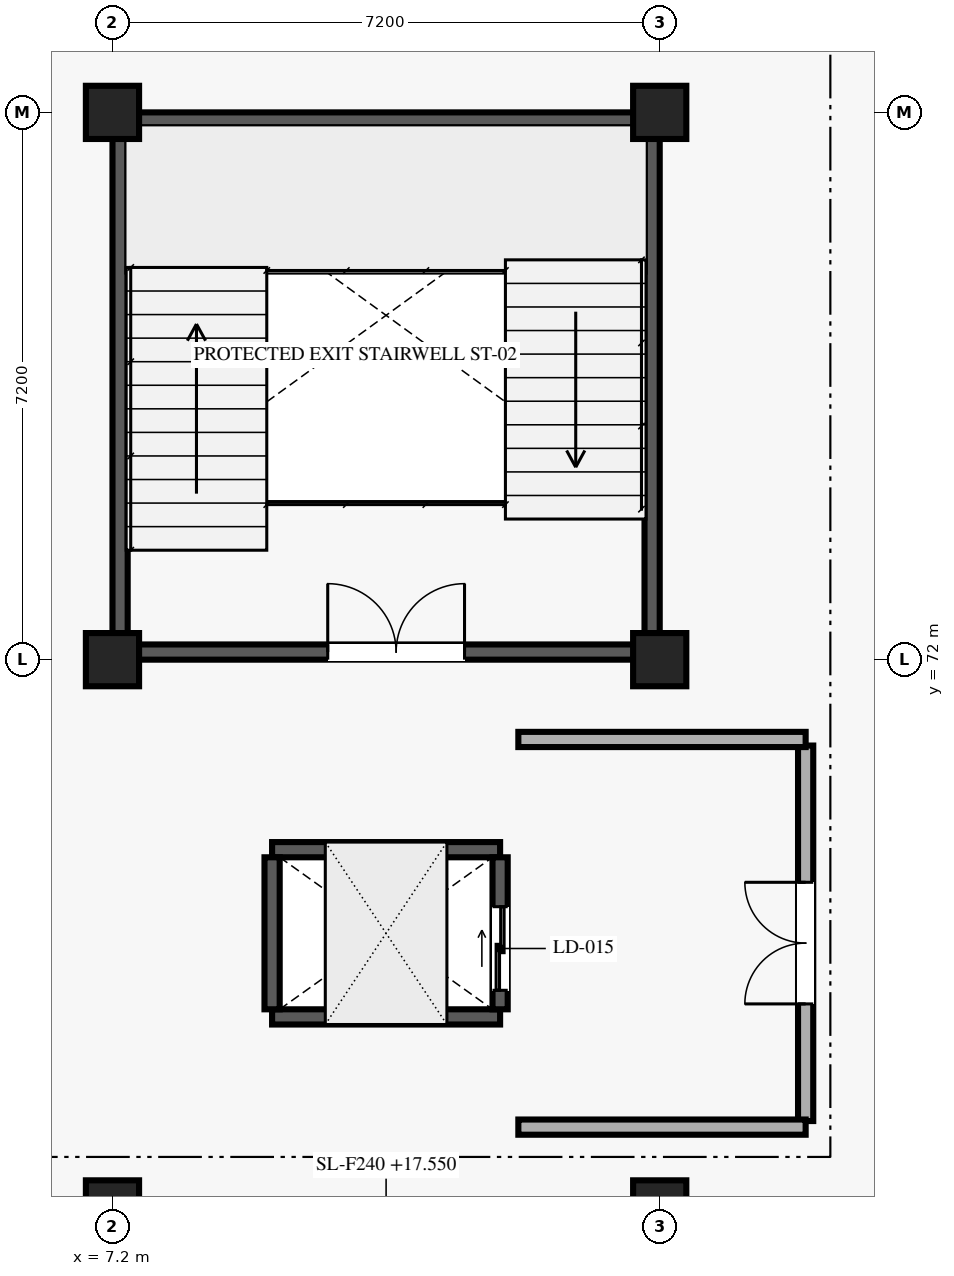
"""IFC4 building model, lengths in metres.
Left out: names, types, materials, properties, quantities, classifications, styles, units other than length and angle.
Written with IfcOpenShell. Run it as: python <this file> out.ifc"""

import sys

from ifc_helpers import new_model, si_unit, direction, frame, frame_2d, origin, origin_2d, place, context, subcontext, project, spatial, rectangle, extrude, element, fill, save


model = new_model("IFC4")
c1 = context("Model", 3, precision=1e-05, world=origin(), true_north=direction((0.0, 1.0)))
c2 = subcontext(c1, "Body", "Model", "MODEL_VIEW")
j1 = project(units=[si_unit("LENGTHUNIT", "METRE"), si_unit("PLANEANGLEUNIT", "RADIAN")], contexts=[c1])
p1 = place(None, origin())
s1 = spatial("IfcSite", under=j1, at=p1, CompositionType="ELEMENT")
p2 = place(p1, origin())
s2 = spatial("IfcBuilding", under=s1, at=p2, CompositionType="ELEMENT")
p3 = place(p2, frame((0.0, 0.0, 17.55)))
s3 = spatial("IfcBuildingStorey", under=s2, at=p3, CompositionType="ELEMENT", Elevation=17.55)
for number, where, z_axis, x_axis in (
    (1, (7.2, 64.8, 0.0), (0.0, 0.0, 1.0), (1.0, 0.0, 0.0)),
    (2, (7.2, 72.0, 0.0), (0.0, 0.0, 1.0), (1.0, 0.0, 0.0)),
    (3, (7.2, 79.2, 0.0), (0.0, 0.0, 1.0), (1.0, 0.0, 0.0)),
    (4, (14.4, 64.8, 0.0), (0.0, 0.0, 1.0), (1.0, 0.0, 0.0)),
    (5, (14.4, 72.0, 0.0), (0.0, 0.0, 1.0), (1.0, 0.0, 0.0)),
    (6, (14.4, 79.2, 0.0), (0.0, 0.0, 1.0), (1.0, 0.0, 0.0)),
):
    element("IfcColumn", number, at=place(p3, frame(where, z_axis=z_axis, x_axis=x_axis)), inside=s3, PredefinedType="COLUMN", context=c2, shape_type="SweptSolid", body=[
        extrude(rectangle(XDim=0.7, YDim=0.7, at=origin_2d()), origin(), (0.0, 0.0, 1.0), 4.05),
    ])
p4 = place(p3, frame((7.4, 72.1, 0.0), z_axis=(0.0, 0.0, 1.0), x_axis=(1.0, 0.0, 0.0)))
e7 = element("IfcWall", 7, at=p4, inside=s3, PredefinedType="SHEAR", context=c2, shape_type="SweptSolid", body=[
    extrude(rectangle(XDim=6.8, YDim=0.2, at=frame_2d((3.4, 0.0))), origin(), (0.0, 0.0, 1.0), 3.83),
])
p5 = place(p4, frame((2.632, 0.0, 0.0)))
e8 = element("IfcOpeningElement", 8, at=p5, cuts=e7, PredefinedType="OPENING", context=c2, shape_type="SweptSolid", body=[
    extrude(rectangle(XDim=1.8, YDim=2.2, at=frame_2d((0.9, 1.1))), frame((0.0, 0.11, 0.0), z_axis=(0.0, -1.0, 0.0), x_axis=(1.0, 0.0, 0.0)), (0.0, 0.0, 1.0), 0.22),
])
for number, where, z_axis, x_axis in (
    (9, (7.4, 79.1, 0.0), (0.0, 0.0, 1.0), (1.0, 0.0, 0.0)),
    (10, (7.3, 72.2, 0.0), (0.0, 0.0, 1.0), (0.0, 1.0, 0.0)),
    (11, (14.3, 72.2, 0.0), (0.0, 0.0, 1.0), (0.0, 1.0, 0.0)),
):
    element("IfcWall", number, at=place(p3, frame(where, z_axis=z_axis, x_axis=x_axis)), inside=s3, PredefinedType="SHEAR", context=c2, shape_type="SweptSolid", body=[
        extrude(rectangle(XDim=6.8, YDim=0.2, at=frame_2d((3.4, 0.0))), origin(), (0.0, 0.0, 1.0), 3.83),
    ])
for number, where, z_axis, x_axis in (
    (12, (9.3, 67.3, 0.0), (0.0, 0.0, 1.0), (1.0, 0.0, 0.0)),
    (13, (9.3, 69.5, 0.0), (0.0, 0.0, 1.0), (1.0, 0.0, 0.0)),
):
    element("IfcWall", number, at=place(p3, frame(where, z_axis=z_axis, x_axis=x_axis)), inside=s3, PredefinedType="SHEAR", context=c2, shape_type="SweptSolid", body=[
        extrude(rectangle(XDim=3.0, YDim=0.2, at=frame_2d((1.5, 0.0))), origin(), (0.0, 0.0, 1.0), 3.83),
    ])
p6 = place(p3, frame((9.3, 67.4, 0.0), z_axis=(0.0, 0.0, 1.0), x_axis=(0.0, 1.0, 0.0)))
e14 = element("IfcWall", 14, at=p6, inside=s3, PredefinedType="SHEAR", context=c2, shape_type="SweptSolid", body=[
    extrude(rectangle(XDim=2.0, YDim=0.2, at=frame_2d((1.0, 0.0))), origin(), (0.0, 0.0, 1.0), 3.83),
])
p7 = place(p3, frame((12.3, 67.4, 0.0), z_axis=(0.0, 0.0, 1.0), x_axis=(0.0, 1.0, 0.0)))
e15 = element("IfcWall", 15, at=p7, inside=s3, PredefinedType="SHEAR", context=c2, shape_type="SweptSolid", body=[
    extrude(rectangle(XDim=2.0, YDim=0.2, at=frame_2d((1.0, 0.0))), origin(), (0.0, 0.0, 1.0), 3.83),
])
p8 = place(p7, frame((0.25, 0.0, 0.0)))
e16 = element("IfcOpeningElement", 16, at=p8, cuts=e15, PredefinedType="OPENING", context=c2, shape_type="SweptSolid", body=[
    extrude(rectangle(XDim=1.1, YDim=2.15, at=frame_2d((0.55, 1.075))), frame((0.0, 0.11, 0.0), z_axis=(0.0, -1.0, 0.0), x_axis=(1.0, 0.0, 0.0)), (0.0, 0.0, 1.0), 0.22),
])
p9 = place(p3, frame((16.32, 65.93, 0.0), z_axis=(0.0, 0.0, 1.0), x_axis=(0.0, 1.0, 0.0)))
e17 = element("IfcWall", 17, at=p9, inside=s3, PredefinedType="SOLIDWALL", context=c2, shape_type="SweptSolid", body=[
    extrude(rectangle(XDim=4.94, YDim=0.2, at=frame_2d((2.47, 0.0))), origin(), (0.0, 0.0, 1.0), 3.83),
])
p10 = place(p9, frame((1.541, 0.0, 0.0)))
e18 = element("IfcOpeningElement", 18, at=p10, cuts=e17, PredefinedType="OPENING", context=c2, shape_type="SweptSolid", body=[
    extrude(rectangle(XDim=1.6, YDim=2.2, at=frame_2d((0.8, 1.1))), frame((0.0, 0.11, 0.0), z_axis=(0.0, -1.0, 0.0), x_axis=(1.0, 0.0, 0.0)), (0.0, 0.0, 1.0), 0.22),
])
for number, where, z_axis, x_axis in (
    (19, (12.54, 65.85, 0.0), (0.0, 0.0, 1.0), (1.0, 0.0, 0.0)),
    (20, (12.54, 70.95, 0.0), (0.0, 0.0, 1.0), (1.0, 0.0, 0.0)),
):
    element("IfcWall", number, at=place(p3, frame(where, z_axis=z_axis, x_axis=x_axis)), inside=s3, PredefinedType="SOLIDWALL", context=c2, shape_type="SweptSolid", body=[
        extrude(rectangle(XDim=3.78, YDim=0.2, at=frame_2d((1.89, 0.0))), origin(), (0.0, 0.0, 1.0), 3.83),
    ])
p11 = place(p5, origin())
e21 = element("IfcDoor", 21, at=p11, inside=s3, OperationType="DOUBLE_DOOR_SINGLE_SWING", PredefinedType="DOOR", context=c2, shape_type="SweptSolid", body=[
    extrude(rectangle(XDim=1.8, YDim=2.2, at=frame_2d((0.9, 1.1))), frame((0.0, 0.025, 0.0), z_axis=(0.0, -1.0, 0.0), x_axis=(1.0, 0.0, 0.0)), (0.0, 0.0, 1.0), 0.05),
])
fill(e8, e21)
p12 = place(p8, origin())
e22 = element("IfcDoor", 22, at=p12, inside=s3, OperationType="DOUBLE_DOOR_SLIDING", PredefinedType="DOOR", context=c2, shape_type="SweptSolid", body=[
    extrude(rectangle(XDim=1.1, YDim=2.15, at=frame_2d((0.55, 1.075))), frame((0.0, 0.025, 0.0), z_axis=(0.0, -1.0, 0.0), x_axis=(1.0, 0.0, 0.0)), (0.0, 0.0, 1.0), 0.05),
])
fill(e16, e22)
p13 = place(p10, origin())
e23 = element("IfcDoor", 23, at=p13, inside=s3, OperationType="DOUBLE_DOOR_SINGLE_SWING", PredefinedType="DOOR", context=c2, shape_type="SweptSolid", body=[
    extrude(rectangle(XDim=1.6, YDim=2.2, at=frame_2d((0.8, 1.1))), frame((0.0, 0.025, 0.0), z_axis=(0.0, -1.0, 0.0), x_axis=(1.0, 0.0, 0.0)), (0.0, 0.0, 1.0), 0.05),
])
fill(e18, e23)
save(model, sys.argv[1])
